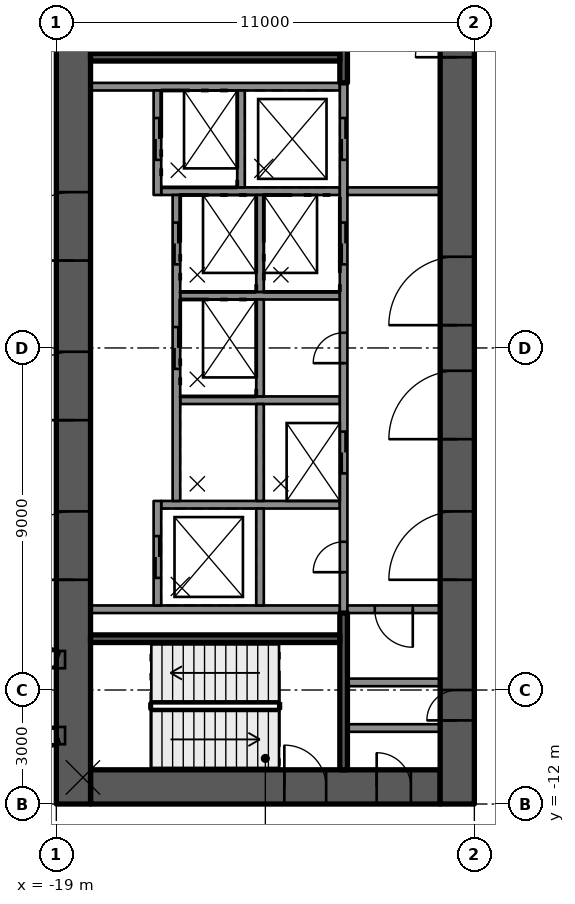
"""IFC4 building model, lengths in metres.
Left out: names, types, materials, properties, quantities, classifications, styles, units other than length and angle.
Written with IfcOpenShell. Run it as: python <this file> out.ifc"""

import sys

from ifc_helpers import new_model, si_unit, direction, frame, frame_2d, origin, place, context, subcontext, project, spatial, rectangle, extrude, element, fill, save


model = new_model("IFC4")
c1 = context("Model", 3, precision=1e-05, world=origin(), true_north=direction((0.0, 1.0)))
c2 = subcontext(c1, "Body", "Model", "MODEL_VIEW")
j1 = project(units=[si_unit("LENGTHUNIT", "METRE"), si_unit("PLANEANGLEUNIT", "RADIAN")], contexts=[c1])
p1 = place(None, origin())
s1 = spatial("IfcSite", under=j1, at=p1, CompositionType="ELEMENT")
p2 = place(p1, origin())
s2 = spatial("IfcBuilding", under=s1, at=p2, CompositionType="ELEMENT")
p3 = place(p2, frame((0.0, 0.0, 141.2)))
s3 = spatial("IfcBuildingStorey", under=s2, at=p3, CompositionType="ELEMENT", Elevation=141.2)
p4 = place(p3, frame((-18.1, -11.55, 0.0), z_axis=(0.0, 0.0, 1.0), x_axis=(1.0, 0.0, 0.0)))
e1 = element("IfcWall", 1, at=p4, inside=s3, PredefinedType="SHEAR", context=c2, shape_type="SweptSolid", body=[
    extrude(rectangle(XDim=9.2, YDim=0.9, at=frame_2d((4.6, 0.0))), origin(), (0.0, 0.0, 1.0), 4.4),
])
p5 = place(p4, frame((5.1, 0.0, 0.0)))
e2 = element("IfcOpeningElement", 2, at=p5, cuts=e1, PredefinedType="OPENING", context=c2, shape_type="SweptSolid", body=[
    extrude(rectangle(XDim=1.1, YDim=2.1, at=frame_2d((0.55, 1.05))), frame((0.0, 0.46, 0.0), z_axis=(0.0, -1.0, 0.0), x_axis=(1.0, 0.0, 0.0)), (0.0, 0.0, 1.0), 0.92),
])
p6 = place(p4, frame((7.53, 0.0, 0.0)))
e3 = element("IfcOpeningElement", 3, at=p6, cuts=e1, PredefinedType="OPENING", context=c2, shape_type="SweptSolid", body=[
    extrude(rectangle(XDim=0.9, YDim=2.1, at=frame_2d((0.45, 1.05))), frame((0.0, 0.46, 0.0), z_axis=(0.0, -1.0, 0.0), x_axis=(1.0, 0.0, 0.0)), (0.0, 0.0, 1.0), 0.92),
])
p7 = place(p3, frame((-18.55, -12.0, 0.0), z_axis=(0.0, 0.0, 1.0), x_axis=(0.0, 1.0, 0.0)))
e4 = element("IfcWall", 4, at=p7, inside=s3, PredefinedType="SHEAR", context=c2, shape_type="SweptSolid", body=[
    extrude(rectangle(XDim=24.0, YDim=0.9, at=frame_2d((12.0, 0.0))), origin(), (0.0, 0.0, 1.0), 4.4),
])
p8 = place(p7, frame((5.9, 0.0, 0.0)))
e5 = element("IfcOpeningElement", 5, at=p8, cuts=e4, PredefinedType="OPENING", context=c2, shape_type="SweptSolid", body=[
    extrude(rectangle(XDim=1.8, YDim=2.1, at=frame_2d((0.9, 1.05))), frame((0.0, 0.46, 0.0), z_axis=(0.0, -1.0, 0.0), x_axis=(1.0, 0.0, 0.0)), (0.0, 0.0, 1.0), 0.92),
])
p9 = place(p7, frame((10.1, 0.0, 0.0)))
e6 = element("IfcOpeningElement", 6, at=p9, cuts=e4, PredefinedType="OPENING", context=c2, shape_type="SweptSolid", body=[
    extrude(rectangle(XDim=1.8, YDim=2.1, at=frame_2d((0.9, 1.05))), frame((0.0, 0.46, 0.0), z_axis=(0.0, -1.0, 0.0), x_axis=(1.0, 0.0, 0.0)), (0.0, 0.0, 1.0), 0.92),
])
p10 = place(p7, frame((14.3, 0.0, 0.0)))
e7 = element("IfcOpeningElement", 7, at=p10, cuts=e4, PredefinedType="OPENING", context=c2, shape_type="SweptSolid", body=[
    extrude(rectangle(XDim=1.8, YDim=2.1, at=frame_2d((0.9, 1.05))), frame((0.0, 0.46, 0.0), z_axis=(0.0, -1.0, 0.0), x_axis=(1.0, 0.0, 0.0)), (0.0, 0.0, 1.0), 0.92),
])
p11 = place(p3, frame((-8.45, -12.0, 0.0), z_axis=(0.0, 0.0, 1.0), x_axis=(0.0, 1.0, 0.0)))
e8 = element("IfcWall", 8, at=p11, inside=s3, PredefinedType="SHEAR", context=c2, shape_type="SweptSolid", body=[
    extrude(rectangle(XDim=24.0, YDim=0.9, at=frame_2d((12.0, 0.0))), origin(), (0.0, 0.0, 1.0), 4.4),
])
p12 = place(p11, frame((9.6, 0.0, 0.0)))
e9 = element("IfcOpeningElement", 9, at=p12, cuts=e8, PredefinedType="OPENING", context=c2, shape_type="SweptSolid", body=[
    extrude(rectangle(XDim=1.8, YDim=2.1, at=frame_2d((0.9, 1.05))), frame((0.0, 0.46, 0.0), z_axis=(0.0, -1.0, 0.0), x_axis=(1.0, 0.0, 0.0)), (0.0, 0.0, 1.0), 0.92),
])
p13 = place(p11, frame((5.9, 0.0, 0.0)))
e10 = element("IfcOpeningElement", 10, at=p13, cuts=e8, PredefinedType="OPENING", context=c2, shape_type="SweptSolid", body=[
    extrude(rectangle(XDim=1.8, YDim=2.1, at=frame_2d((0.9, 1.05))), frame((0.0, 0.46, 0.0), z_axis=(0.0, -1.0, 0.0), x_axis=(1.0, 0.0, 0.0)), (0.0, 0.0, 1.0), 0.92),
])
p14 = place(p11, frame((12.6, 0.0, 0.0)))
e11 = element("IfcOpeningElement", 11, at=p14, cuts=e8, PredefinedType="OPENING", context=c2, shape_type="SweptSolid", body=[
    extrude(rectangle(XDim=1.8, YDim=2.1, at=frame_2d((0.9, 1.05))), frame((0.0, 0.46, 0.0), z_axis=(0.0, -1.0, 0.0), x_axis=(1.0, 0.0, 0.0)), (0.0, 0.0, 1.0), 0.92),
])
p15 = place(p11, frame((19.65, 0.0, 0.0)))
e12 = element("IfcOpeningElement", 12, at=p15, cuts=e8, PredefinedType="OPENING", context=c2, shape_type="SweptSolid", body=[
    extrude(rectangle(XDim=1.1, YDim=2.1, at=frame_2d((0.55, 1.05))), frame((0.0, 0.46, 0.0), z_axis=(0.0, -1.0, 0.0), x_axis=(1.0, 0.0, 0.0)), (0.0, 0.0, 1.0), 0.92),
])
p16 = place(p11, frame((2.2, 0.0, 0.0)))
e13 = element("IfcOpeningElement", 13, at=p16, cuts=e8, PredefinedType="OPENING", context=c2, shape_type="SweptSolid", body=[
    extrude(rectangle(XDim=0.8, YDim=2.1, at=frame_2d((0.4, 1.05))), frame((0.0, 0.46, 0.0), z_axis=(0.0, -1.0, 0.0), x_axis=(1.0, 0.0, 0.0)), (0.0, 0.0, 1.0), 0.92),
])
for number, where, z_axis, x_axis in (
    (14, (-11.54, 6.875, 0.0), (0.0, 0.0, 1.0), (-1.0, 0.0, 0.0)),
    (15, (-11.54, -6.875, 0.0), (0.0, 0.0, 1.0), (-1.0, 0.0, 0.0)),
):
    element("IfcWall", number, at=place(p3, frame(where, z_axis=z_axis, x_axis=x_axis)), inside=s3, PredefinedType="SOLIDWALL", context=c2, shape_type="SweptSolid", body=[
        extrude(rectangle(XDim=6.56, YDim=0.2, at=frame_2d((3.28, 0.0))), origin(), (0.0, 0.0, 1.0), 3.99),
    ])
p17 = place(p3, frame((-11.54, -4.125, 0.0), z_axis=(0.0, 0.0, 1.0), x_axis=(-1.0, 0.0, 0.0)))
e16 = element("IfcWall", 16, at=p17, inside=s3, PredefinedType="SOLIDWALL", context=c2, shape_type="SweptSolid", body=[
    extrude(rectangle(XDim=4.7, YDim=0.2, at=frame_2d((2.35, 0.0))), origin(), (0.0, 0.0, 1.0), 3.99),
])
for number, where, z_axis, x_axis in (
    (17, (-11.54, -1.375, 0.0), (0.0, 0.0, 1.0), (-1.0, 0.0, 0.0)),
    (18, (-11.54, 1.375, 0.0), (0.0, 0.0, 1.0), (-1.0, 0.0, 0.0)),
):
    element("IfcWall", number, at=place(p3, frame(where, z_axis=z_axis, x_axis=x_axis)), inside=s3, PredefinedType="SOLIDWALL", context=c2, shape_type="SweptSolid", body=[
        extrude(rectangle(XDim=4.2, YDim=0.2, at=frame_2d((2.1, 0.0))), origin(), (0.0, 0.0, 1.0), 3.99),
    ])
p18 = place(p3, frame((-11.54, 4.125, 0.0), z_axis=(0.0, 0.0, 1.0), x_axis=(-1.0, 0.0, 0.0)))
e19 = element("IfcWall", 19, at=p18, inside=s3, PredefinedType="SOLIDWALL", context=c2, shape_type="SweptSolid", body=[
    extrude(rectangle(XDim=4.7, YDim=0.2, at=frame_2d((2.35, 0.0))), origin(), (0.0, 0.0, 1.0), 3.99),
])
p19 = place(p3, frame((-11.44, -6.975, 0.0), z_axis=(0.0, 0.0, 1.0), x_axis=(0.0, 1.0, 0.0)))
e20 = element("IfcWall", 20, at=p19, inside=s3, PredefinedType="SOLIDWALL", context=c2, shape_type="SweptSolid", body=[
    extrude(rectangle(XDim=13.95, YDim=0.2, at=frame_2d((6.975, 0.0))), origin(), (0.0, 0.0, 1.0), 3.99),
])
p20 = place(p19, frame((3.675, 0.0, 0.0)))
e21 = element("IfcOpeningElement", 21, at=p20, cuts=e20, PredefinedType="OPENING", context=c2, shape_type="SweptSolid", body=[
    extrude(rectangle(XDim=1.1, YDim=2.1, at=frame_2d((0.55, 1.05))), frame((0.0, 0.11, 0.0), z_axis=(0.0, -1.0, 0.0), x_axis=(1.0, 0.0, 0.0)), (0.0, 0.0, 1.0), 0.22),
])
p21 = place(p19, frame((9.175, 0.0, 0.0)))
e22 = element("IfcOpeningElement", 22, at=p21, cuts=e20, PredefinedType="OPENING", context=c2, shape_type="SweptSolid", body=[
    extrude(rectangle(XDim=1.1, YDim=2.1, at=frame_2d((0.55, 1.05))), frame((0.0, 0.11, 0.0), z_axis=(0.0, -1.0, 0.0), x_axis=(1.0, 0.0, 0.0)), (0.0, 0.0, 1.0), 0.22),
])
p22 = place(p19, frame((11.925, 0.0, 0.0)))
e23 = element("IfcOpeningElement", 23, at=p22, cuts=e20, PredefinedType="OPENING", context=c2, shape_type="SweptSolid", body=[
    extrude(rectangle(XDim=1.1, YDim=2.1, at=frame_2d((0.55, 1.05))), frame((0.0, 0.11, 0.0), z_axis=(0.0, -1.0, 0.0), x_axis=(1.0, 0.0, 0.0)), (0.0, 0.0, 1.0), 0.22),
])
p23 = place(p19, frame((1.075, 0.0, 0.0)))
e24 = element("IfcOpeningElement", 24, at=p23, cuts=e20, PredefinedType="OPENING", context=c2, shape_type="SweptSolid", body=[
    extrude(rectangle(XDim=0.8, YDim=2.1, at=frame_2d((0.4, 1.05))), frame((0.0, 0.11, 0.0), z_axis=(0.0, -1.0, 0.0), x_axis=(1.0, 0.0, 0.0)), (0.0, 0.0, 1.0), 0.22),
])
p24 = place(p19, frame((6.575, 0.0, 0.0)))
e25 = element("IfcOpeningElement", 25, at=p24, cuts=e20, PredefinedType="OPENING", context=c2, shape_type="SweptSolid", body=[
    extrude(rectangle(XDim=0.8, YDim=2.1, at=frame_2d((0.4, 1.05))), frame((0.0, 0.11, 0.0), z_axis=(0.0, -1.0, 0.0), x_axis=(1.0, 0.0, 0.0)), (0.0, 0.0, 1.0), 0.22),
])
for number, where, z_axis, x_axis in (
    (26, (-13.64, -6.775, 0.0), (0.0, 0.0, 1.0), (0.0, 1.0, 0.0)),
    (27, (-13.64, -4.025, 0.0), (0.0, 0.0, 1.0), (0.0, 1.0, 0.0)),
    (28, (-13.64, -1.275, 0.0), (0.0, 0.0, 1.0), (0.0, 1.0, 0.0)),
    (29, (-13.64, 1.475, 0.0), (0.0, 0.0, 1.0), (0.0, 1.0, 0.0)),
    (30, (-14.14, 4.225, 0.0), (0.0, 0.0, 1.0), (0.0, 1.0, 0.0)),
):
    element("IfcWall", number, at=place(p3, frame(where, z_axis=z_axis, x_axis=x_axis)), inside=s3, PredefinedType="SOLIDWALL", context=c2, shape_type="SweptSolid", body=[
        extrude(rectangle(XDim=2.55, YDim=0.2, at=frame_2d((1.275, 0.0))), origin(), (0.0, 0.0, 1.0), 3.99),
    ])
p25 = place(p3, frame((-16.34, -6.775, 0.0), z_axis=(0.0, 0.0, 1.0), x_axis=(0.0, 1.0, 0.0)))
e31 = element("IfcWall", 31, at=p25, inside=s3, PredefinedType="SOLIDWALL", context=c2, shape_type="SweptSolid", body=[
    extrude(rectangle(XDim=2.75, YDim=0.2, at=frame_2d((1.375, 0.0))), origin(), (0.0, 0.0, 1.0), 3.99),
])
p26 = place(p25, frame((0.725, 0.0, 0.0)))
e32 = element("IfcOpeningElement", 32, at=p26, cuts=e31, PredefinedType="OPENING", context=c2, shape_type="SweptSolid", body=[
    extrude(rectangle(XDim=1.1, YDim=2.1, at=frame_2d((0.55, 1.05))), frame((0.0, 0.11, 0.0), z_axis=(0.0, -1.0, 0.0), x_axis=(1.0, 0.0, 0.0)), (0.0, 0.0, 1.0), 0.22),
])
p27 = place(p3, frame((-15.84, -4.025, 0.0), z_axis=(0.0, 0.0, 1.0), x_axis=(0.0, 1.0, 0.0)))
e33 = element("IfcWall", 33, at=p27, inside=s3, PredefinedType="SOLIDWALL", context=c2, shape_type="SweptSolid", body=[
    extrude(rectangle(XDim=8.05, YDim=0.2, at=frame_2d((4.025, 0.0))), origin(), (0.0, 0.0, 1.0), 3.99),
])
p28 = place(p27, frame((3.475, 0.0, 0.0)))
e34 = element("IfcOpeningElement", 34, at=p28, cuts=e33, PredefinedType="OPENING", context=c2, shape_type="SweptSolid", body=[
    extrude(rectangle(XDim=1.1, YDim=2.1, at=frame_2d((0.55, 1.05))), frame((0.0, 0.11, 0.0), z_axis=(0.0, -1.0, 0.0), x_axis=(1.0, 0.0, 0.0)), (0.0, 0.0, 1.0), 0.22),
])
p29 = place(p27, frame((6.225, 0.0, 0.0)))
e35 = element("IfcOpeningElement", 35, at=p29, cuts=e33, PredefinedType="OPENING", context=c2, shape_type="SweptSolid", body=[
    extrude(rectangle(XDim=1.1, YDim=2.1, at=frame_2d((0.55, 1.05))), frame((0.0, 0.11, 0.0), z_axis=(0.0, -1.0, 0.0), x_axis=(1.0, 0.0, 0.0)), (0.0, 0.0, 1.0), 0.22),
])
p30 = place(p3, frame((-16.34, 4.025, 0.0), z_axis=(0.0, 0.0, 1.0), x_axis=(0.0, 1.0, 0.0)))
e36 = element("IfcWall", 36, at=p30, inside=s3, PredefinedType="SOLIDWALL", context=c2, shape_type="SweptSolid", body=[
    extrude(rectangle(XDim=2.75, YDim=0.2, at=frame_2d((1.375, 0.0))), origin(), (0.0, 0.0, 1.0), 3.99),
])
p31 = place(p30, frame((0.925, 0.0, 0.0)))
e37 = element("IfcOpeningElement", 37, at=p31, cuts=e36, PredefinedType="OPENING", context=c2, shape_type="SweptSolid", body=[
    extrude(rectangle(XDim=1.1, YDim=2.1, at=frame_2d((0.55, 1.05))), frame((0.0, 0.11, 0.0), z_axis=(0.0, -1.0, 0.0), x_axis=(1.0, 0.0, 0.0)), (0.0, 0.0, 1.0), 0.22),
])
p32 = place(p3, frame((-11.44, 6.975, 0.0), z_axis=(0.0, 0.0, 1.0), x_axis=(0.0, 1.0, 0.0)))
e38 = element("IfcWall", 38, at=p32, inside=s3, PredefinedType="SOLIDWALL", context=c2, shape_type="SweptSolid", body=[
    extrude(rectangle(XDim=4.125, YDim=0.2, at=frame_2d((2.062, 0.0))), origin(), (0.0, 0.0, 1.0), 3.99),
])
p33 = place(p32, frame((2.1, 0.0, 0.0)))
e39 = element("IfcOpeningElement", 39, at=p33, cuts=e38, PredefinedType="OPENING", context=c2, shape_type="SweptSolid", body=[
    extrude(rectangle(XDim=1.1, YDim=2.1, at=frame_2d((0.55, 1.05))), frame((0.0, 0.11, 0.0), z_axis=(0.0, -1.0, 0.0), x_axis=(1.0, 0.0, 0.0)), (0.0, 0.0, 1.0), 0.22),
])
p34 = place(p3, frame((-11.54, 7.65, 0.0), z_axis=(0.0, 0.0, 1.0), x_axis=(-1.0, 0.0, 0.0)))
e40 = element("IfcWall", 40, at=p34, inside=s3, PredefinedType="SOLIDWALL", context=c2, shape_type="SweptSolid", body=[
    extrude(rectangle(XDim=6.56, YDim=0.2, at=frame_2d((3.28, 0.0))), origin(), (0.0, 0.0, 1.0), 3.99),
])
p35 = place(p3, frame((-11.44, -11.1, 0.0), z_axis=(0.0, 0.0, 1.0), x_axis=(0.0, 1.0, 0.0)))
e41 = element("IfcWall", 41, at=p35, inside=s3, PredefinedType="SOLIDWALL", context=c2, shape_type="SweptSolid", body=[
    extrude(rectangle(XDim=4.125, YDim=0.2, at=frame_2d((2.062, 0.0))), origin(), (0.0, 0.0, 1.0), 3.99),
])
p36 = place(p3, frame((-11.54, -7.65, 0.0), z_axis=(0.0, 0.0, 1.0), x_axis=(-1.0, 0.0, 0.0)))
e42 = element("IfcWall", 42, at=p36, inside=s3, PredefinedType="SOLIDWALL", context=c2, shape_type="SweptSolid", body=[
    extrude(rectangle(XDim=6.56, YDim=0.2, at=frame_2d((3.28, 0.0))), origin(), (0.0, 0.0, 1.0), 3.99),
])
p37 = place(p3, frame((-8.9, 4.125, 0.0), z_axis=(0.0, 0.0, 1.0), x_axis=(-1.0, 0.0, 0.0)))
e43 = element("IfcWall", 43, at=p37, inside=s3, PredefinedType="PARTITIONING", context=c2, shape_type="SweptSolid", body=[
    extrude(rectangle(XDim=2.44, YDim=0.2, at=frame_2d((1.22, 0.0))), origin(), (0.0, 0.0, 1.0), 3.99),
])
p38 = place(p3, frame((-8.9, -6.875, 0.0), z_axis=(0.0, 0.0, 1.0), x_axis=(-1.0, 0.0, 0.0)))
e44 = element("IfcWall", 44, at=p38, inside=s3, PredefinedType="PARTITIONING", context=c2, shape_type="SweptSolid", body=[
    extrude(rectangle(XDim=2.44, YDim=0.2, at=frame_2d((1.22, 0.0))), origin(), (0.0, 0.0, 1.0), 3.99),
])
p39 = place(p38, frame((0.72, 0.0, 0.0)))
e45 = element("IfcOpeningElement", 45, at=p39, cuts=e44, PredefinedType="OPENING", context=c2, shape_type="SweptSolid", body=[
    extrude(rectangle(XDim=1.0, YDim=2.1, at=frame_2d((0.5, 1.05))), frame((0.0, 0.11, 0.0), z_axis=(0.0, -1.0, 0.0), x_axis=(1.0, 0.0, 0.0)), (0.0, 0.0, 1.0), 0.22),
])
for number, where, z_axis, x_axis in (
    (46, (-8.9, -10.0, 0.0), (0.0, 0.0, 1.0), (-1.0, 0.0, 0.0)),
    (47, (-8.9, -8.8, 0.0), (0.0, 0.0, 1.0), (-1.0, 0.0, 0.0)),
):
    element("IfcWall", number, at=place(p3, frame(where, z_axis=z_axis, x_axis=x_axis)), inside=s3, PredefinedType="PARTITIONING", context=c2, shape_type="SweptSolid", body=[
        extrude(rectangle(XDim=2.44, YDim=0.2, at=frame_2d((1.22, 0.0))), origin(), (0.0, 0.0, 1.0), 3.99),
    ])
p40 = place(p26, origin())
e48 = element("IfcDoor", 48, at=p40, inside=s3, OperationType="DOUBLE_DOOR_SLIDING", PredefinedType="DOOR", context=c2, shape_type="SweptSolid", body=[
    extrude(rectangle(XDim=1.1, YDim=2.1, at=frame_2d((0.55, 1.05))), frame((0.0, 0.025, 0.0), z_axis=(0.0, -1.0, 0.0), x_axis=(1.0, 0.0, 0.0)), (0.0, 0.0, 1.0), 0.05),
])
fill(e32, e48)
p41 = place(p20, origin())
e49 = element("IfcDoor", 49, at=p41, inside=s3, OperationType="DOUBLE_DOOR_SLIDING", PredefinedType="DOOR", context=c2, shape_type="SweptSolid", body=[
    extrude(rectangle(XDim=1.1, YDim=2.1, at=frame_2d((0.55, 1.05))), frame((0.0, 0.025, 0.0), z_axis=(0.0, -1.0, 0.0), x_axis=(1.0, 0.0, 0.0)), (0.0, 0.0, 1.0), 0.05),
])
fill(e21, e49)
p42 = place(p28, origin())
e50 = element("IfcDoor", 50, at=p42, inside=s3, OperationType="DOUBLE_DOOR_SLIDING", PredefinedType="DOOR", context=c2, shape_type="SweptSolid", body=[
    extrude(rectangle(XDim=1.1, YDim=2.1, at=frame_2d((0.55, 1.05))), frame((0.0, 0.025, 0.0), z_axis=(0.0, -1.0, 0.0), x_axis=(1.0, 0.0, 0.0)), (0.0, 0.0, 1.0), 0.05),
])
fill(e34, e50)
p43 = place(p21, origin())
e51 = element("IfcDoor", 51, at=p43, inside=s3, OperationType="DOUBLE_DOOR_SLIDING", PredefinedType="DOOR", context=c2, shape_type="SweptSolid", body=[
    extrude(rectangle(XDim=1.1, YDim=2.1, at=frame_2d((0.55, 1.05))), frame((0.0, 0.025, 0.0), z_axis=(0.0, -1.0, 0.0), x_axis=(1.0, 0.0, 0.0)), (0.0, 0.0, 1.0), 0.05),
])
fill(e22, e51)
p44 = place(p29, origin())
e52 = element("IfcDoor", 52, at=p44, inside=s3, OperationType="DOUBLE_DOOR_SLIDING", PredefinedType="DOOR", context=c2, shape_type="SweptSolid", body=[
    extrude(rectangle(XDim=1.1, YDim=2.1, at=frame_2d((0.55, 1.05))), frame((0.0, 0.025, 0.0), z_axis=(0.0, -1.0, 0.0), x_axis=(1.0, 0.0, 0.0)), (0.0, 0.0, 1.0), 0.05),
])
fill(e35, e52)
p45 = place(p22, origin())
e53 = element("IfcDoor", 53, at=p45, inside=s3, OperationType="DOUBLE_DOOR_SLIDING", PredefinedType="DOOR", context=c2, shape_type="SweptSolid", body=[
    extrude(rectangle(XDim=1.1, YDim=2.1, at=frame_2d((0.55, 1.05))), frame((0.0, 0.025, 0.0), z_axis=(0.0, -1.0, 0.0), x_axis=(1.0, 0.0, 0.0)), (0.0, 0.0, 1.0), 0.05),
])
fill(e23, e53)
p46 = place(p31, origin())
e54 = element("IfcDoor", 54, at=p46, inside=s3, OperationType="DOUBLE_DOOR_SLIDING", PredefinedType="DOOR", context=c2, shape_type="SweptSolid", body=[
    extrude(rectangle(XDim=1.1, YDim=2.1, at=frame_2d((0.55, 1.05))), frame((0.0, 0.025, 0.0), z_axis=(0.0, -1.0, 0.0), x_axis=(1.0, 0.0, 0.0)), (0.0, 0.0, 1.0), 0.05),
])
fill(e37, e54)
p47 = place(p23, origin())
e55 = element("IfcDoor", 55, at=p47, inside=s3, OperationType="SINGLE_SWING_LEFT", PredefinedType="DOOR", context=c2, shape_type="SweptSolid", body=[
    extrude(rectangle(XDim=0.8, YDim=2.1, at=frame_2d((0.4, 1.05))), frame((0.0, 0.025, 0.0), z_axis=(0.0, -1.0, 0.0), x_axis=(1.0, 0.0, 0.0)), (0.0, 0.0, 1.0), 0.05),
])
fill(e24, e55)
p48 = place(p24, origin())
e56 = element("IfcDoor", 56, at=p48, inside=s3, OperationType="SINGLE_SWING_LEFT", PredefinedType="DOOR", context=c2, shape_type="SweptSolid", body=[
    extrude(rectangle(XDim=0.8, YDim=2.1, at=frame_2d((0.4, 1.05))), frame((0.0, 0.025, 0.0), z_axis=(0.0, -1.0, 0.0), x_axis=(1.0, 0.0, 0.0)), (0.0, 0.0, 1.0), 0.05),
])
fill(e25, e56)
p49 = place(p12, origin())
e57 = element("IfcDoor", 57, at=p49, inside=s3, OperationType="SINGLE_SWING_LEFT", PredefinedType="DOOR", context=c2, shape_type="SweptSolid", body=[
    extrude(rectangle(XDim=1.8, YDim=2.1, at=frame_2d((0.9, 1.05))), frame((0.0, 0.025, 0.0), z_axis=(0.0, -1.0, 0.0), x_axis=(1.0, 0.0, 0.0)), (0.0, 0.0, 1.0), 0.05),
])
fill(e9, e57)
p50 = place(p8, origin())
e58 = element("IfcDoor", 58, at=p50, inside=s3, OperationType="SINGLE_SWING_LEFT", PredefinedType="DOOR", context=c2, shape_type="SweptSolid", body=[
    extrude(rectangle(XDim=1.8, YDim=2.1, at=frame_2d((0.9, 1.05))), frame((0.0, 0.025, 0.0), z_axis=(0.0, -1.0, 0.0), x_axis=(1.0, 0.0, 0.0)), (0.0, 0.0, 1.0), 0.05),
])
fill(e5, e58)
p51 = place(p9, origin())
e59 = element("IfcDoor", 59, at=p51, inside=s3, OperationType="SINGLE_SWING_LEFT", PredefinedType="DOOR", context=c2, shape_type="SweptSolid", body=[
    extrude(rectangle(XDim=1.8, YDim=2.1, at=frame_2d((0.9, 1.05))), frame((0.0, 0.025, 0.0), z_axis=(0.0, -1.0, 0.0), x_axis=(1.0, 0.0, 0.0)), (0.0, 0.0, 1.0), 0.05),
])
fill(e6, e59)
p52 = place(p10, origin())
e60 = element("IfcDoor", 60, at=p52, inside=s3, OperationType="SINGLE_SWING_RIGHT", PredefinedType="DOOR", context=c2, shape_type="SweptSolid", body=[
    extrude(rectangle(XDim=1.8, YDim=2.1, at=frame_2d((0.9, 1.05))), frame((0.0, 0.025, 0.0), z_axis=(0.0, -1.0, 0.0), x_axis=(1.0, 0.0, 0.0)), (0.0, 0.0, 1.0), 0.05),
])
fill(e7, e60)
p53 = place(p13, origin())
e61 = element("IfcDoor", 61, at=p53, inside=s3, OperationType="SINGLE_SWING_LEFT", PredefinedType="DOOR", context=c2, shape_type="SweptSolid", body=[
    extrude(rectangle(XDim=1.8, YDim=2.1, at=frame_2d((0.9, 1.05))), frame((0.0, 0.025, 0.0), z_axis=(0.0, -1.0, 0.0), x_axis=(1.0, 0.0, 0.0)), (0.0, 0.0, 1.0), 0.05),
])
fill(e10, e61)
p54 = place(p14, origin())
e62 = element("IfcDoor", 62, at=p54, inside=s3, OperationType="SINGLE_SWING_RIGHT", PredefinedType="DOOR", context=c2, shape_type="SweptSolid", body=[
    extrude(rectangle(XDim=1.8, YDim=2.1, at=frame_2d((0.9, 1.05))), frame((0.0, 0.025, 0.0), z_axis=(0.0, -1.0, 0.0), x_axis=(1.0, 0.0, 0.0)), (0.0, 0.0, 1.0), 0.05),
])
fill(e11, e62)
p55 = place(p15, origin())
e63 = element("IfcDoor", 63, at=p55, inside=s3, OperationType="SINGLE_SWING_RIGHT", PredefinedType="DOOR", context=c2, shape_type="SweptSolid", body=[
    extrude(rectangle(XDim=1.1, YDim=2.1, at=frame_2d((0.55, 1.05))), frame((0.0, 0.025, 0.0), z_axis=(0.0, -1.0, 0.0), x_axis=(1.0, 0.0, 0.0)), (0.0, 0.0, 1.0), 0.05),
])
fill(e12, e63)
p56 = place(p5, origin())
e64 = element("IfcDoor", 64, at=p56, inside=s3, OperationType="SINGLE_SWING_RIGHT", PredefinedType="DOOR", context=c2, shape_type="SweptSolid", body=[
    extrude(rectangle(XDim=1.1, YDim=2.1, at=frame_2d((0.55, 1.05))), frame((0.0, 0.025, 0.0), z_axis=(0.0, -1.0, 0.0), x_axis=(1.0, 0.0, 0.0)), (0.0, 0.0, 1.0), 0.05),
])
fill(e2, e64)
p57 = place(p6, origin())
e65 = element("IfcDoor", 65, at=p57, inside=s3, OperationType="SINGLE_SWING_RIGHT", PredefinedType="DOOR", context=c2, shape_type="SweptSolid", body=[
    extrude(rectangle(XDim=0.9, YDim=2.1, at=frame_2d((0.45, 1.05))), frame((0.0, 0.025, 0.0), z_axis=(0.0, -1.0, 0.0), x_axis=(1.0, 0.0, 0.0)), (0.0, 0.0, 1.0), 0.05),
])
fill(e3, e65)
p58 = place(p16, origin())
e66 = element("IfcDoor", 66, at=p58, inside=s3, OperationType="SINGLE_SWING_LEFT", PredefinedType="DOOR", context=c2, shape_type="SweptSolid", body=[
    extrude(rectangle(XDim=0.8, YDim=2.1, at=frame_2d((0.4, 1.05))), frame((0.0, 0.025, 0.0), z_axis=(0.0, -1.0, 0.0), x_axis=(1.0, 0.0, 0.0)), (0.0, 0.0, 1.0), 0.05),
])
fill(e13, e66)
p59 = place(p39, origin())
e67 = element("IfcDoor", 67, at=p59, inside=s3, OperationType="SINGLE_SWING_RIGHT", PredefinedType="DOOR", context=c2, shape_type="SweptSolid", body=[
    extrude(rectangle(XDim=1.0, YDim=2.1, at=frame_2d((0.5, 1.05))), frame((0.0, 0.025, 0.0), z_axis=(0.0, -1.0, 0.0), x_axis=(1.0, 0.0, 0.0)), (0.0, 0.0, 1.0), 0.05),
])
fill(e45, e67)
save(model, sys.argv[1])
